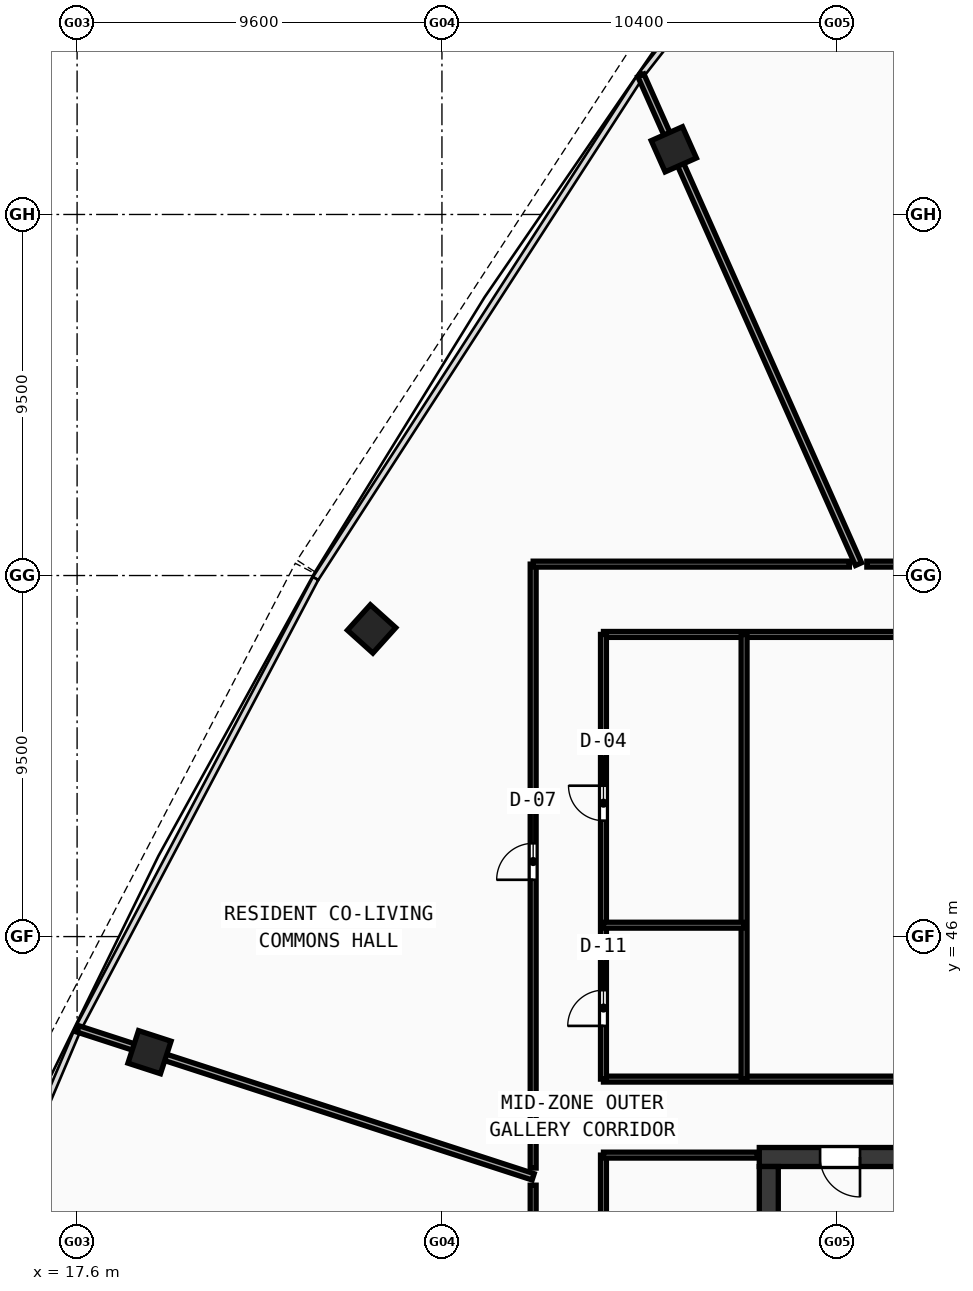
"""IFC4 building model, lengths in metres.
Left out: names, types, materials, properties, quantities, classifications, styles, units other than length and angle.
Written with IfcOpenShell. Run it as: python <this file> out.ifc"""

import sys

from ifc_helpers import new_model, si_unit, direction, frame, frame_2d, origin, origin_with_axes, origin_2d, place, context, subcontext, project, spatial, rectangle, hollow_rectangle, extrude, source, transform, mapped, element, fill, save


model = new_model("IFC4")
c1 = context("Model", 3, precision=1e-05, world=origin(), true_north=direction((0.0, 1.0)))
c2 = subcontext(c1, "Body", "Model", "MODEL_VIEW")
j1 = project(units=[si_unit("LENGTHUNIT", "METRE"), si_unit("PLANEANGLEUNIT", "RADIAN")], contexts=[c1])
p1 = place(None, origin())
s1 = spatial("IfcSite", under=j1, at=p1, CompositionType="ELEMENT")
p2 = place(p1, origin())
s2 = spatial("IfcBuilding", under=s1, at=p2, CompositionType="ELEMENT")
p3 = place(p2, frame((0.0, 0.0, 196.16)))
s3 = spatial("IfcBuildingStorey", under=s2, at=p3, CompositionType="ELEMENT", Elevation=196.16)
p4 = place(p3, frame((35.55, 40.2, 0.0), z_axis=(0.0, 0.0, 1.0), x_axis=(1.0, 0.0, 0.0)))
e1 = element("IfcWall", 1, at=p4, inside=s3, PredefinedType="SHEAR", context=c2, shape_type="SweptSolid", body=[
    extrude(rectangle(XDim=11.25, YDim=0.5, at=frame_2d((5.625, 0.0))), origin(), (0.0, 0.0, 1.0), 3.54),
])
p5 = place(p4, frame((1.6, 0.0, 0.0)))
e2 = element("IfcOpeningElement", 2, at=p5, cuts=e1, PredefinedType="OPENING", context=c2, shape_type="SweptSolid", body=[
    extrude(rectangle(XDim=1.05, YDim=2.1, at=frame_2d((0.525, 1.05))), frame((0.0, 0.26, 0.0), z_axis=(0.0, -1.0, 0.0), x_axis=(1.0, 0.0, 0.0)), (0.0, 0.0, 1.0), 0.52),
])
p6 = place(p3, frame((35.8, 27.75, 0.0), z_axis=(0.0, 0.0, 1.0), x_axis=(0.0, 1.0, 0.0)))
e3 = element("IfcWall", 3, at=p6, inside=s3, PredefinedType="SHEAR", context=c2, shape_type="SweptSolid", body=[
    extrude(rectangle(XDim=12.2, YDim=0.5, at=frame_2d((6.1, 0.0))), origin(), (0.0, 0.0, 1.0), 3.54),
])
m1 = source(origin(), c2, "Body", "SweptSolid", [
    extrude(hollow_rectangle(XDim=0.9, YDim=0.9, WallThickness=0.036, at=origin_2d()), origin(), (0.0, 0.0, 1.0), 3.8),
])
for number, where, z_axis, x_axis in (
    (4, (33.301, 66.715, -0.26), (0.0, 0.0, 1.0), (-0.914, -0.407, 0.0)),
    (5, (25.349, 54.095, -0.26), (0.0, 0.0, 1.0), (-0.669, -0.743, 0.0)),
    (6, (19.505, 42.958, -0.26), (0.0, 0.0, 1.0), (-0.309, -0.951, 0.0)),
):
    element("IfcColumn", number, at=place(p3, frame(where, z_axis=z_axis, x_axis=x_axis)), inside=s3, PredefinedType="COLUMN", context=c2, shape_type="MappedRepresentation", body=[
        mapped(m1, transform((0.0, 0.0, 0.0), scale=1.0)),
    ])
p7 = place(p3, frame((31.45, 42.25, 0.0), z_axis=(0.0, 0.0, 1.0), x_axis=(1.0, 0.0, 0.0)))
e7 = element("IfcWall", 7, at=p7, inside=s3, PredefinedType="PARTITIONING", context=c2, shape_type="SweptSolid", body=[
    extrude(rectangle(XDim=33.1, YDim=0.155, at=frame_2d((16.55, 0.0))), origin(), (0.0, 0.0, 1.0), 2.89),
])
p8 = place(p3, frame((31.45, 53.95, 0.0), z_axis=(0.0, 0.0, 1.0), x_axis=(1.0, 0.0, 0.0)))
e8 = element("IfcWall", 8, at=p8, inside=s3, PredefinedType="PARTITIONING", context=c2, shape_type="SweptSolid", body=[
    extrude(rectangle(XDim=33.1, YDim=0.155, at=frame_2d((16.55, 0.0))), origin(), (0.0, 0.0, 1.0), 2.89),
])
p9 = place(p8, frame((8.0, 0.0, 0.0)))
e9 = element("IfcOpeningElement", 9, at=p9, cuts=e8, PredefinedType="OPENING", context=c2, shape_type="SweptSolid", body=[
    extrude(rectangle(XDim=0.92, YDim=2.1, at=frame_2d((0.46, 1.05))), frame((0.0, 0.087, 0.0), z_axis=(0.0, -1.0, 0.0), x_axis=(1.0, 0.0, 0.0)), (0.0, 0.0, 1.0), 0.175),
])
p10 = place(p8, frame((26.05, 0.0, 0.0)))
e10 = element("IfcOpeningElement", 10, at=p10, cuts=e8, PredefinedType="OPENING", context=c2, shape_type="SweptSolid", body=[
    extrude(rectangle(XDim=0.92, YDim=2.1, at=frame_2d((0.46, 1.05))), frame((0.0, 0.087, 0.0), z_axis=(0.0, -1.0, 0.0), x_axis=(1.0, 0.0, 0.0)), (0.0, 0.0, 1.0), 0.175),
])
p11 = place(p3, frame((31.45, 42.25, 0.0), z_axis=(0.0, 0.0, 1.0), x_axis=(0.0, 1.0, 0.0)))
e11 = element("IfcWall", 11, at=p11, inside=s3, PredefinedType="PARTITIONING", context=c2, shape_type="SweptSolid", body=[
    extrude(rectangle(XDim=11.7, YDim=0.155, at=frame_2d((5.85, 0.0))), origin(), (0.0, 0.0, 1.0), 2.89),
])
p12 = place(p11, frame((1.4, 0.0, 0.0)))
e12 = element("IfcOpeningElement", 12, at=p12, cuts=e11, PredefinedType="OPENING", context=c2, shape_type="SweptSolid", body=[
    extrude(rectangle(XDim=0.94, YDim=2.1, at=frame_2d((0.47, 1.05))), frame((0.0, 0.087, 0.0), z_axis=(0.0, -1.0, 0.0), x_axis=(1.0, 0.0, 0.0)), (0.0, 0.0, 1.0), 0.175),
])
p13 = place(p11, frame((6.8, 0.0, 0.0)))
e13 = element("IfcOpeningElement", 13, at=p13, cuts=e11, PredefinedType="OPENING", context=c2, shape_type="SweptSolid", body=[
    extrude(rectangle(XDim=0.92, YDim=2.1, at=frame_2d((0.46, 1.05))), frame((0.0, 0.087, 0.0), z_axis=(0.0, -1.0, 0.0), x_axis=(1.0, 0.0, 0.0)), (0.0, 0.0, 1.0), 0.175),
])
p14 = place(p3, frame((35.15, 42.25, 0.0), z_axis=(0.0, 0.0, 1.0), x_axis=(0.0, 1.0, 0.0)))
e14 = element("IfcWall", 14, at=p14, inside=s3, PredefinedType="PARTITIONING", context=c2, shape_type="SweptSolid", body=[
    extrude(rectangle(XDim=11.7, YDim=0.155, at=frame_2d((5.85, 0.0))), origin(), (0.0, 0.0, 1.0), 2.89),
])
p15 = place(p3, frame((31.45, 46.3, 0.0), z_axis=(0.0, 0.0, 1.0), x_axis=(1.0, 0.0, 0.0)))
e15 = element("IfcWall", 15, at=p15, inside=s3, PredefinedType="PARTITIONING", context=c2, shape_type="SweptSolid", body=[
    extrude(rectangle(XDim=3.7, YDim=0.155, at=frame_2d((1.85, 0.0))), origin(), (0.0, 0.0, 1.0), 2.89),
])
p16 = place(p3, frame((31.45, 23.65, 0.0), z_axis=(0.0, 0.0, 1.0), x_axis=(0.0, 1.0, 0.0)))
e16 = element("IfcWall", 16, at=p16, inside=s3, PredefinedType="PARTITIONING", context=c2, shape_type="SweptSolid", body=[
    extrude(rectangle(XDim=16.6, YDim=0.155, at=frame_2d((8.3, 0.0))), origin(), (0.0, 0.0, 1.0), 2.89),
])
p17 = place(p16, frame((7.5, 0.0, 0.0)))
e17 = element("IfcOpeningElement", 17, at=p17, cuts=e16, PredefinedType="OPENING", context=c2, shape_type="SweptSolid", body=[
    extrude(rectangle(XDim=0.9, YDim=2.08, at=frame_2d((0.45, 1.04))), frame((0.0, 0.087, 0.0), z_axis=(0.0, -1.0, 0.0), x_axis=(1.0, 0.0, 0.0)), (0.0, 0.0, 1.0), 0.175),
])
p18 = place(p3, frame((31.45, 40.25, 0.0), z_axis=(0.0, 0.0, 1.0), x_axis=(1.0, 0.0, 0.0)))
e18 = element("IfcWall", 18, at=p18, inside=s3, PredefinedType="PARTITIONING", context=c2, shape_type="SweptSolid", body=[
    extrude(rectangle(XDim=4.05, YDim=0.155, at=frame_2d((2.025, 0.0))), origin(), (0.0, 0.0, 1.0), 3.54),
])
p19 = place(p3, frame((38.16, 55.8, 0.0), z_axis=(0.0, 0.0, 1.0), x_axis=(-0.406725691424, 0.913550333554, 0.0)))
e19 = element("IfcWall", 19, at=p19, inside=s3, PredefinedType="PARTITIONING", context=c2, shape_type="SweptSolid", body=[
    extrude(rectangle(XDim=14.078, YDim=0.175, at=frame_2d((7.039, 0.0))), origin(), (0.0, 0.0, 1.0), 2.89),
])
p20 = place(p3, frame((29.6, 39.678, 0.0), z_axis=(0.0, 0.0, 1.0), x_axis=(-0.951056149915, 0.309018121975, 0.0)))
e20 = element("IfcWall", 20, at=p20, inside=s3, PredefinedType="PARTITIONING", context=c2, shape_type="SweptSolid", body=[
    extrude(rectangle(XDim=12.593, YDim=0.175, at=frame_2d((6.296, 0.0))), origin(), (0.0, 0.0, 1.0), 2.89),
])
p21 = place(p3, frame((29.6, 30.675, 0.0), z_axis=(0.0, 0.0, 1.0), x_axis=(0.0, 1.0, 0.0)))
e21 = element("IfcWall", 21, at=p21, inside=s3, PredefinedType="PARTITIONING", context=c2, shape_type="SweptSolid", body=[
    extrude(rectangle(XDim=8.783, YDim=0.155, at=frame_2d((4.392, 0.0))), origin(), (0.0, 0.0, 1.0), 3.14),
])
p22 = place(p21, frame((3.932, 0.0, 0.0)))
e22 = element("IfcOpeningElement", 22, at=p22, cuts=e21, PredefinedType="OPENING", context=c2, shape_type="SweptSolid", body=[
    extrude(rectangle(XDim=0.92, YDim=2.1, at=frame_2d((0.46, 1.05))), frame((0.0, 0.087, 0.0), z_axis=(0.0, -1.0, 0.0), x_axis=(1.0, 0.0, 0.0)), (0.0, 0.0, 1.0), 0.175),
])
p23 = place(p3, frame((29.6, 39.91, 0.0), z_axis=(0.0, 0.0, 1.0), x_axis=(0.0, 1.0, 0.0)))
e23 = element("IfcWall", 23, at=p23, inside=s3, PredefinedType="PARTITIONING", context=c2, shape_type="SweptSolid", body=[
    extrude(rectangle(XDim=15.89, YDim=0.155, at=frame_2d((7.945, 0.0))), origin(), (0.0, 0.0, 1.0), 2.89),
])
p24 = place(p23, frame((7.584, 0.0, 0.0)))
e24 = element("IfcOpeningElement", 24, at=p24, cuts=e23, PredefinedType="OPENING", context=c2, shape_type="SweptSolid", body=[
    extrude(rectangle(XDim=0.96, YDim=2.12, at=frame_2d((0.48, 1.06))), frame((0.0, 0.087, 0.0), z_axis=(0.0, -1.0, 0.0), x_axis=(1.0, 0.0, 0.0)), (0.0, 0.0, 1.0), 0.175),
])
p25 = place(p3, frame((29.6, 55.8, 0.0), z_axis=(0.0, 0.0, 1.0), x_axis=(1.0, 0.0, 0.0)))
e25 = element("IfcWall", 25, at=p25, inside=s3, PredefinedType="PARTITIONING", context=c2, shape_type="SweptSolid", body=[
    extrude(rectangle(XDim=8.32, YDim=0.155, at=frame_2d((4.16, 0.0))), origin(), (0.0, 0.0, 1.0), 3.14),
])
p26 = place(p3, frame((38.38, 55.8, 0.0), z_axis=(0.0, 0.0, 1.0), x_axis=(1.0, 0.0, 0.0)))
e26 = element("IfcWall", 26, at=p26, inside=s3, PredefinedType="PARTITIONING", context=c2, shape_type="SweptSolid", body=[
    extrude(rectangle(XDim=5.329, YDim=0.155, at=frame_2d((2.665, 0.0))), origin(), (0.0, 0.0, 1.0), 2.89),
])
p27 = place(p26, frame((2.13, 0.0, 0.0)))
e27 = element("IfcOpeningElement", 27, at=p27, cuts=e26, PredefinedType="OPENING", context=c2, shape_type="SweptSolid", body=[
    extrude(rectangle(XDim=0.92, YDim=2.1, at=frame_2d((0.46, 1.05))), frame((0.0, 0.087, 0.0), z_axis=(0.0, -1.0, 0.0), x_axis=(1.0, 0.0, 0.0)), (0.0, 0.0, 1.0), 0.175),
])
m2 = source(origin(), c2, "Body", "SweptSolid", [
    extrude(rectangle(XDim=1.05, YDim=2.1, at=frame_2d((0.525, 1.05))), frame((0.0, 0.025, 0.0), z_axis=(0.0, -1.0, 0.0), x_axis=(1.0, 0.0, 0.0)), (0.0, 0.0, 1.0), 0.05),
])
p28 = place(p5, frame((1.05, 0.0, 0.0), z_axis=(0.0, 0.0, 1.0), x_axis=(-1.0, 0.0, 0.0)))
e28 = element("IfcDoor", 28, at=p28, inside=s3, OperationType="SINGLE_SWING_LEFT", PredefinedType="DOOR", context=c2, shape_type="MappedRepresentation", body=[
    mapped(m2, transform((0.0, 0.0, 0.0), scale=1.0)),
])
fill(e2, e28)
m3 = source(origin(), c2, "Body", "SweptSolid", [
    extrude(rectangle(XDim=0.94, YDim=2.1, at=frame_2d((0.47, 1.05))), frame((0.0, 0.025, 0.0), z_axis=(0.0, -1.0, 0.0), x_axis=(1.0, 0.0, 0.0)), (0.0, 0.0, 1.0), 0.05),
])
p29 = place(p12, origin_with_axes())
e29 = element("IfcDoor", 29, at=p29, inside=s3, OperationType="SINGLE_SWING_LEFT", PredefinedType="DOOR", context=c2, shape_type="MappedRepresentation", body=[
    mapped(m3, transform((0.0, 0.0, 0.0), scale=1.0)),
])
fill(e12, e29)
m4 = source(origin(), c2, "Body", "SweptSolid", [
    extrude(rectangle(XDim=0.92, YDim=2.1, at=frame_2d((0.46, 1.05))), frame((0.0, 0.025, 0.0), z_axis=(0.0, -1.0, 0.0), x_axis=(1.0, 0.0, 0.0)), (0.0, 0.0, 1.0), 0.05),
])
p30 = place(p13, origin_with_axes())
e30 = element("IfcDoor", 30, at=p30, inside=s3, OperationType="SINGLE_SWING_RIGHT", PredefinedType="DOOR", context=c2, shape_type="MappedRepresentation", body=[
    mapped(m4, transform((0.0, 0.0, 0.0), scale=1.0)),
])
fill(e13, e30)
m5 = source(origin(), c2, "Body", "SweptSolid", [
    extrude(rectangle(XDim=0.96, YDim=2.12, at=frame_2d((0.48, 1.06))), frame((0.0, 0.025, 0.0), z_axis=(0.0, -1.0, 0.0), x_axis=(1.0, 0.0, 0.0)), (0.0, 0.0, 1.0), 0.05),
])
p31 = place(p24, origin_with_axes())
e31 = element("IfcDoor", 31, at=p31, inside=s3, OperationType="SINGLE_SWING_LEFT", PredefinedType="DOOR", context=c2, shape_type="MappedRepresentation", body=[
    mapped(m5, transform((0.0, 0.0, 0.0), scale=1.0)),
])
fill(e24, e31)
save(model, sys.argv[1])
